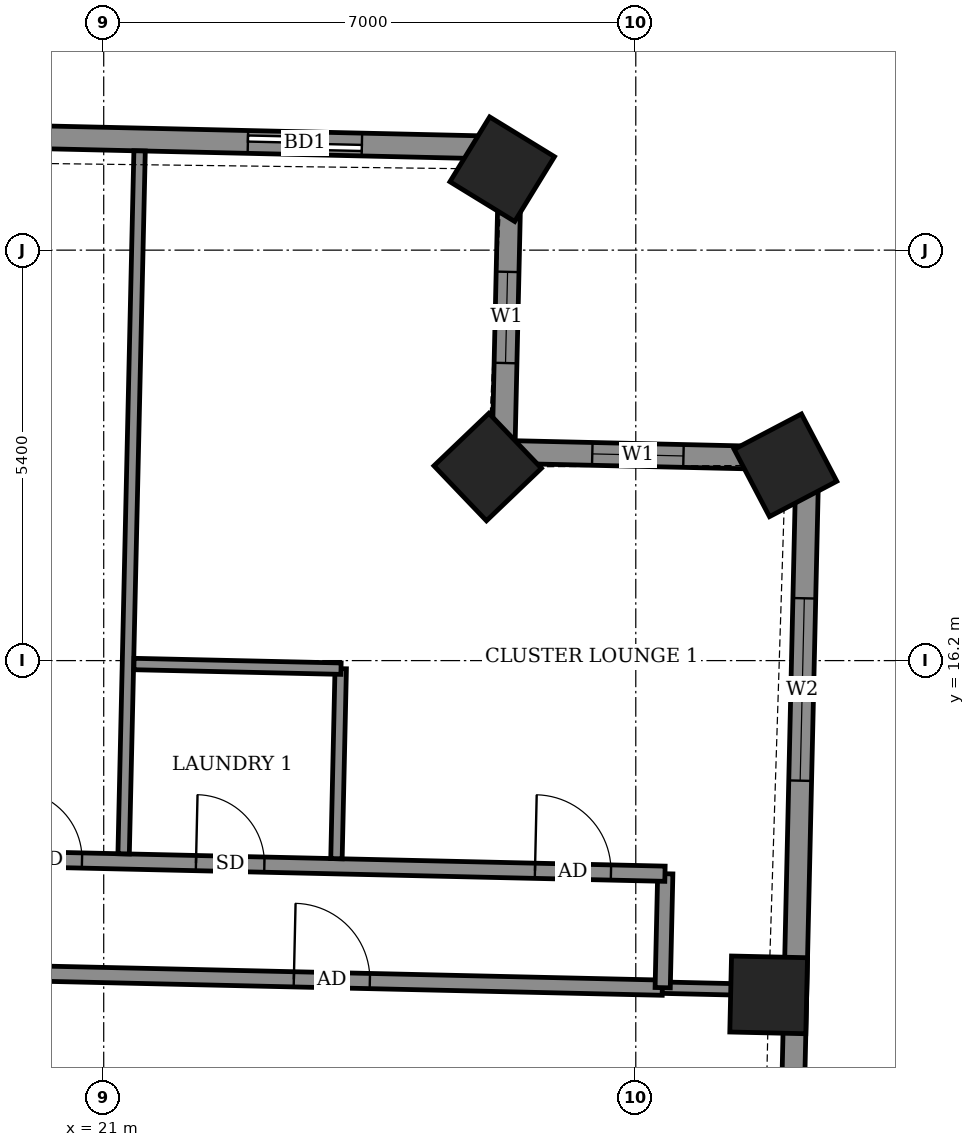
"""IFC4 building model, lengths in metres.
Left out: names, types, materials, properties, quantities, classifications, styles, units other than length and angle.
Written with IfcOpenShell. Run it as: python <this file> out.ifc"""

import sys

from ifc_helpers import new_model, si_unit, direction, frame, frame_2d, origin, origin_2d, place, context, subcontext, project, spatial, rectangle, extrude, element, fill, save


model = new_model("IFC4")
c1 = context("Model", 3, precision=1e-05, world=origin(), true_north=direction((0.0, 1.0)))
c2 = subcontext(c1, "Body", "Model", "MODEL_VIEW")
j1 = project(units=[si_unit("LENGTHUNIT", "METRE"), si_unit("PLANEANGLEUNIT", "RADIAN")], contexts=[c1])
p1 = place(None, origin())
s1 = spatial("IfcSite", under=j1, at=p1, CompositionType="ELEMENT")
p2 = place(p1, origin())
s2 = spatial("IfcBuilding", under=s1, at=p2, CompositionType="ELEMENT")
p3 = place(p2, frame((0.0, 0.0, 271.7)))
s3 = spatial("IfcBuildingStorey", under=s2, at=p3, CompositionType="ELEMENT", Elevation=271.7)
for number, where, z_axis, x_axis in (
    (1, (29.748, 11.802, -0.55), (0.0, 0.0, 1.0), (0.023, 1.0, 0.0)),
    (2, (29.969, 18.77, -0.55), (0.0, 0.0, 1.0), (-0.465, 0.885, 0.0)),
    (3, (26.052, 18.747, -0.55), (0.0, 0.0, 1.0), (-0.691, 0.723, 0.0)),
    (4, (26.243, 22.665, -0.55), (0.0, 0.0, 1.0), (-0.852, 0.523, 0.0)),
):
    element("IfcColumn", number, at=place(p3, frame(where, z_axis=z_axis, x_axis=x_axis)), inside=s3, PredefinedType="COLUMN", context=c2, shape_type="SweptSolid", body=[
        extrude(rectangle(XDim=1.0, YDim=1.0, at=origin_2d()), origin(), (0.0, 0.0, 1.0), 3.6),
    ])
p4 = place(p3, frame((29.923, 4.085, 0.0), z_axis=(0.0, 0.0, 1.0), x_axis=(0.022738672774, 0.999741442954, 0.0)))
e5 = element("IfcWall", 5, at=p4, inside=s3, PredefinedType="SOLIDWALL", context=c2, shape_type="SweptSolid", body=[
    extrude(rectangle(XDim=14.774, YDim=0.3, at=frame_2d((7.387, 0.0))), origin(), (0.0, 0.0, 1.0), 2.55),
])
p5 = place(p4, frame((4.853, 0.0, 0.0)))
e6 = element("IfcOpeningElement", 6, at=p5, cuts=e5, PredefinedType="OPENING", context=c2, shape_type="SweptSolid", body=[
    extrude(rectangle(XDim=1.5, YDim=2.4, at=frame_2d((0.75, 1.2))), frame((0.0, 0.16, 0.0), z_axis=(0.0, -1.0, 0.0), x_axis=(1.0, 0.0, 0.0)), (0.0, 0.0, 1.0), 0.32),
])
p6 = place(p4, frame((10.538, 0.0, 0.9)))
e7 = element("IfcOpeningElement", 7, at=p6, cuts=e5, PredefinedType="OPENING", context=c2, shape_type="SweptSolid", body=[
    extrude(rectangle(XDim=2.4, YDim=1.5, at=frame_2d((1.2, 0.75))), frame((0.0, 0.16, 0.0), z_axis=(0.0, -1.0, 0.0), x_axis=(1.0, 0.0, 0.0)), (0.0, 0.0, 1.0), 0.32),
])
p7 = place(p3, frame((30.259, 18.855, 0.0), z_axis=(0.0, 0.0, 1.0), x_axis=(-0.999740826251, 0.022765770952, 0.0)))
e8 = element("IfcWall", 8, at=p7, inside=s3, PredefinedType="SOLIDWALL", context=c2, shape_type="SweptSolid", body=[
    extrude(rectangle(XDim=4.0, YDim=0.3, at=frame_2d((2.0, 0.0))), origin(), (0.0, 0.0, 1.0), 2.55),
])
p8 = place(p7, frame((1.632, 0.0, 0.9)))
e9 = element("IfcOpeningElement", 9, at=p8, cuts=e8, PredefinedType="OPENING", context=c2, shape_type="SweptSolid", body=[
    extrude(rectangle(XDim=1.2, YDim=1.5, at=frame_2d((0.6, 0.75))), frame((0.0, 0.16, 0.0), z_axis=(0.0, -1.0, 0.0), x_axis=(1.0, 0.0, 0.0)), (0.0, 0.0, 1.0), 0.32),
])
p9 = place(p3, frame((26.26, 18.946, 0.0), z_axis=(0.0, 0.0, 1.0), x_axis=(0.022521758502, 0.999746353029, 0.0)))
e10 = element("IfcWall", 10, at=p9, inside=s3, PredefinedType="SOLIDWALL", context=c2, shape_type="SweptSolid", body=[
    extrude(rectangle(XDim=4.0, YDim=0.3, at=frame_2d((2.0, 0.0))), origin(), (0.0, 0.0, 1.0), 2.55),
])
p10 = place(p9, frame((1.169, 0.0, 0.9)))
e11 = element("IfcOpeningElement", 11, at=p10, cuts=e10, PredefinedType="OPENING", context=c2, shape_type="SweptSolid", body=[
    extrude(rectangle(XDim=1.2, YDim=1.5, at=frame_2d((0.6, 0.75))), frame((0.0, 0.16, 0.0), z_axis=(0.0, -1.0, 0.0), x_axis=(1.0, 0.0, 0.0)), (0.0, 0.0, 1.0), 0.32),
])
p11 = place(p3, frame((26.35, 22.945, 0.0), z_axis=(0.0, 0.0, 1.0), x_axis=(-0.999742523712, 0.022691105788, 0.0)))
e12 = element("IfcWall", 12, at=p11, inside=s3, PredefinedType="SOLIDWALL", context=c2, shape_type="SweptSolid", body=[
    extrude(rectangle(XDim=47.771, YDim=0.3, at=frame_2d((23.886, 0.0))), origin(), (0.0, 0.0, 1.0), 2.55),
])
p12 = place(p11, frame((1.954, 0.0, 0.0)))
e13 = element("IfcOpeningElement", 13, at=p12, cuts=e12, PredefinedType="OPENING", context=c2, shape_type="SweptSolid", body=[
    extrude(rectangle(XDim=1.5, YDim=2.4, at=frame_2d((0.75, 1.2))), frame((0.0, 0.16, 0.0), z_axis=(0.0, -1.0, 0.0), x_axis=(1.0, 0.0, 0.0)), (0.0, 0.0, 1.0), 0.32),
])
p13 = place(p11, frame((7.37, 0.0, 0.0)))
e14 = element("IfcOpeningElement", 14, at=p13, cuts=e12, PredefinedType="OPENING", context=c2, shape_type="SweptSolid", body=[
    extrude(rectangle(XDim=1.5, YDim=2.4, at=frame_2d((0.75, 1.2))), frame((0.0, 0.16, 0.0), z_axis=(0.0, -1.0, 0.0), x_axis=(1.0, 0.0, 0.0)), (0.0, 0.0, 1.0), 0.32),
])
p14 = place(p11, frame((10.554, 0.0, 0.0)))
e15 = element("IfcOpeningElement", 15, at=p14, cuts=e12, PredefinedType="OPENING", context=c2, shape_type="SweptSolid", body=[
    extrude(rectangle(XDim=1.5, YDim=2.4, at=frame_2d((0.75, 1.2))), frame((0.0, 0.16, 0.0), z_axis=(0.0, -1.0, 0.0), x_axis=(1.0, 0.0, 0.0)), (0.0, 0.0, 1.0), 0.32),
])
p15 = place(p11, frame((15.104, 0.0, 0.0)))
e16 = element("IfcOpeningElement", 16, at=p15, cuts=e12, PredefinedType="OPENING", context=c2, shape_type="SweptSolid", body=[
    extrude(rectangle(XDim=1.5, YDim=2.4, at=frame_2d((0.75, 1.2))), frame((0.0, 0.16, 0.0), z_axis=(0.0, -1.0, 0.0), x_axis=(1.0, 0.0, 0.0)), (0.0, 0.0, 1.0), 0.32),
])
p16 = place(p11, frame((18.287, 0.0, 0.0)))
e17 = element("IfcOpeningElement", 17, at=p16, cuts=e12, PredefinedType="OPENING", context=c2, shape_type="SweptSolid", body=[
    extrude(rectangle(XDim=1.5, YDim=2.4, at=frame_2d((0.75, 1.2))), frame((0.0, 0.16, 0.0), z_axis=(0.0, -1.0, 0.0), x_axis=(1.0, 0.0, 0.0)), (0.0, 0.0, 1.0), 0.32),
])
p17 = place(p11, frame((23.622, 0.0, 0.0)))
e18 = element("IfcOpeningElement", 18, at=p17, cuts=e12, PredefinedType="OPENING", context=c2, shape_type="SweptSolid", body=[
    extrude(rectangle(XDim=1.5, YDim=2.4, at=frame_2d((0.75, 1.2))), frame((0.0, 0.16, 0.0), z_axis=(0.0, -1.0, 0.0), x_axis=(1.0, 0.0, 0.0)), (0.0, 0.0, 1.0), 0.32),
])
p18 = place(p11, frame((28.521, 0.0, 0.0)))
e19 = element("IfcOpeningElement", 19, at=p18, cuts=e12, PredefinedType="OPENING", context=c2, shape_type="SweptSolid", body=[
    extrude(rectangle(XDim=1.5, YDim=2.4, at=frame_2d((0.75, 1.2))), frame((0.0, 0.16, 0.0), z_axis=(0.0, -1.0, 0.0), x_axis=(1.0, 0.0, 0.0)), (0.0, 0.0, 1.0), 0.32),
])
p19 = place(p11, frame((31.705, 0.0, 0.0)))
e20 = element("IfcOpeningElement", 20, at=p19, cuts=e12, PredefinedType="OPENING", context=c2, shape_type="SweptSolid", body=[
    extrude(rectangle(XDim=1.5, YDim=2.4, at=frame_2d((0.75, 1.2))), frame((0.0, 0.16, 0.0), z_axis=(0.0, -1.0, 0.0), x_axis=(1.0, 0.0, 0.0)), (0.0, 0.0, 1.0), 0.32),
])
p20 = place(p11, frame((36.722, 0.0, 0.0)))
e21 = element("IfcOpeningElement", 21, at=p20, cuts=e12, PredefinedType="OPENING", context=c2, shape_type="SweptSolid", body=[
    extrude(rectangle(XDim=1.5, YDim=2.4, at=frame_2d((0.75, 1.2))), frame((0.0, 0.16, 0.0), z_axis=(0.0, -1.0, 0.0), x_axis=(1.0, 0.0, 0.0)), (0.0, 0.0, 1.0), 0.32),
])
p21 = place(p11, frame((41.963, 0.0, 0.0)))
e22 = element("IfcOpeningElement", 22, at=p21, cuts=e12, PredefinedType="OPENING", context=c2, shape_type="SweptSolid", body=[
    extrude(rectangle(XDim=1.5, YDim=2.4, at=frame_2d((0.75, 1.2))), frame((0.0, 0.16, 0.0), z_axis=(0.0, -1.0, 0.0), x_axis=(1.0, 0.0, 0.0)), (0.0, 0.0, 1.0), 0.32),
])
p22 = place(p11, frame((44.436, 0.0, 0.9)))
e23 = element("IfcOpeningElement", 23, at=p22, cuts=e12, PredefinedType="OPENING", context=c2, shape_type="SweptSolid", body=[
    extrude(rectangle(XDim=2.4, YDim=1.5, at=frame_2d((1.2, 0.75))), frame((0.0, 0.16, 0.0), z_axis=(0.0, -1.0, 0.0), x_axis=(1.0, 0.0, 0.0)), (0.0, 0.0, 1.0), 0.32),
])
p23 = place(p3, frame((17.753, 12.137, 0.0), z_axis=(0.0, 0.0, 1.0), x_axis=(0.999743663474, -0.022640833553, 0.0)))
e24 = element("IfcWall", 24, at=p23, inside=s3, PredefinedType="PARTITIONING", context=c2, shape_type="SweptSolid", body=[
    extrude(rectangle(XDim=10.6, YDim=0.2, at=frame_2d((5.3, 0.0))), origin(), (0.0, 0.0, 1.0), 3.05),
])
p24 = place(p23, frame((5.75, 0.0, 0.0)))
e25 = element("IfcOpeningElement", 25, at=p24, cuts=e24, PredefinedType="OPENING", context=c2, shape_type="SweptSolid", body=[
    extrude(rectangle(XDim=1.0, YDim=2.1, at=frame_2d((0.5, 1.05))), frame((0.0, 0.11, 0.0), z_axis=(0.0, -1.0, 0.0), x_axis=(1.0, 0.0, 0.0)), (0.0, 0.0, 1.0), 0.22),
])
p25 = place(p3, frame((28.35, 11.897, 0.0), z_axis=(0.0, 0.0, 1.0), x_axis=(0.999734618493, -0.023036765969, 0.0)))
e26 = element("IfcWall", 26, at=p25, inside=s3, PredefinedType="PARTITIONING", context=c2, shape_type="SweptSolid", body=[
    extrude(rectangle(XDim=1.6, YDim=0.15, at=frame_2d((0.8, 0.0))), origin(), (0.0, 0.0, 1.0), 3.05),
])
p26 = place(p3, frame((28.354, 11.897, 0.0), z_axis=(0.0, 0.0, 1.0), x_axis=(0.022632637625, 0.99974384905, 0.0)))
e27 = element("IfcWall", 27, at=p26, inside=s3, PredefinedType="PARTITIONING", context=c2, shape_type="SweptSolid", body=[
    extrude(rectangle(XDim=1.5, YDim=0.2, at=frame_2d((0.75, 0.0))), origin(), (0.0, 0.0, 1.0), 3.05),
])
p27 = place(p3, frame((-24.474, 14.596, 0.0), z_axis=(0.0, 0.0, 1.0), x_axis=(0.999742424031, -0.022695497208, 0.0)))
e28 = element("IfcWall", 28, at=p27, inside=s3, PredefinedType="PARTITIONING", context=c2, shape_type="SweptSolid", body=[
    extrude(rectangle(XDim=52.872, YDim=0.2, at=frame_2d((26.436, 0.0))), origin(), (0.0, 0.0, 1.0), 3.05),
])
p28 = place(p27, frame((51.161, 0.0, 0.0)))
e29 = element("IfcOpeningElement", 29, at=p28, cuts=e28, PredefinedType="OPENING", context=c2, shape_type="SweptSolid", body=[
    extrude(rectangle(XDim=1.0, YDim=2.1, at=frame_2d((0.5, 1.05))), frame((0.0, 0.11, 0.0), z_axis=(0.0, -1.0, 0.0), x_axis=(1.0, 0.0, 0.0)), (0.0, 0.0, 1.0), 0.22),
])
p29 = place(p27, frame((46.7, 0.0, 0.0)))
e30 = element("IfcOpeningElement", 30, at=p29, cuts=e28, PredefinedType="OPENING", context=c2, shape_type="SweptSolid", body=[
    extrude(rectangle(XDim=0.9, YDim=2.1, at=frame_2d((0.45, 1.05))), frame((0.0, 0.11, 0.0), z_axis=(0.0, -1.0, 0.0), x_axis=(1.0, 0.0, 0.0)), (0.0, 0.0, 1.0), 0.22),
])
p30 = place(p27, frame((44.3, 0.0, 0.0)))
e31 = element("IfcOpeningElement", 31, at=p30, cuts=e28, PredefinedType="OPENING", context=c2, shape_type="SweptSolid", body=[
    extrude(rectangle(XDim=0.9, YDim=2.1, at=frame_2d((0.45, 1.05))), frame((0.0, 0.11, 0.0), z_axis=(0.0, -1.0, 0.0), x_axis=(1.0, 0.0, 0.0)), (0.0, 0.0, 1.0), 0.22),
])
p31 = place(p27, frame((37.575, 0.0, 0.0)))
e32 = element("IfcOpeningElement", 32, at=p31, cuts=e28, PredefinedType="OPENING", context=c2, shape_type="SweptSolid", body=[
    extrude(rectangle(XDim=0.9, YDim=2.1, at=frame_2d((0.45, 1.05))), frame((0.0, 0.11, 0.0), z_axis=(0.0, -1.0, 0.0), x_axis=(1.0, 0.0, 0.0)), (0.0, 0.0, 1.0), 0.22),
])
p32 = place(p27, frame((35.675, 0.0, 0.0)))
e33 = element("IfcOpeningElement", 33, at=p32, cuts=e28, PredefinedType="OPENING", context=c2, shape_type="SweptSolid", body=[
    extrude(rectangle(XDim=0.9, YDim=2.1, at=frame_2d((0.45, 1.05))), frame((0.0, 0.11, 0.0), z_axis=(0.0, -1.0, 0.0), x_axis=(1.0, 0.0, 0.0)), (0.0, 0.0, 1.0), 0.22),
])
p33 = place(p27, frame((28.95, 0.0, 0.0)))
e34 = element("IfcOpeningElement", 34, at=p33, cuts=e28, PredefinedType="OPENING", context=c2, shape_type="SweptSolid", body=[
    extrude(rectangle(XDim=0.9, YDim=2.1, at=frame_2d((0.45, 1.05))), frame((0.0, 0.11, 0.0), z_axis=(0.0, -1.0, 0.0), x_axis=(1.0, 0.0, 0.0)), (0.0, 0.0, 1.0), 0.22),
])
p34 = place(p27, frame((27.0, 0.0, 0.0)))
e35 = element("IfcOpeningElement", 35, at=p34, cuts=e28, PredefinedType="OPENING", context=c2, shape_type="SweptSolid", body=[
    extrude(rectangle(XDim=0.9, YDim=2.1, at=frame_2d((0.45, 1.05))), frame((0.0, 0.11, 0.0), z_axis=(0.0, -1.0, 0.0), x_axis=(1.0, 0.0, 0.0)), (0.0, 0.0, 1.0), 0.22),
])
p35 = place(p27, frame((20.2, 0.0, 0.0)))
e36 = element("IfcOpeningElement", 36, at=p35, cuts=e28, PredefinedType="OPENING", context=c2, shape_type="SweptSolid", body=[
    extrude(rectangle(XDim=0.9, YDim=2.1, at=frame_2d((0.45, 1.05))), frame((0.0, 0.11, 0.0), z_axis=(0.0, -1.0, 0.0), x_axis=(1.0, 0.0, 0.0)), (0.0, 0.0, 1.0), 0.22),
])
p36 = place(p27, frame((18.25, 0.0, 0.0)))
e37 = element("IfcOpeningElement", 37, at=p36, cuts=e28, PredefinedType="OPENING", context=c2, shape_type="SweptSolid", body=[
    extrude(rectangle(XDim=0.9, YDim=2.1, at=frame_2d((0.45, 1.05))), frame((0.0, 0.11, 0.0), z_axis=(0.0, -1.0, 0.0), x_axis=(1.0, 0.0, 0.0)), (0.0, 0.0, 1.0), 0.22),
])
p37 = place(p27, frame((11.5, 0.0, 0.0)))
e38 = element("IfcOpeningElement", 38, at=p37, cuts=e28, PredefinedType="OPENING", context=c2, shape_type="SweptSolid", body=[
    extrude(rectangle(XDim=0.9, YDim=2.1, at=frame_2d((0.45, 1.05))), frame((0.0, 0.11, 0.0), z_axis=(0.0, -1.0, 0.0), x_axis=(1.0, 0.0, 0.0)), (0.0, 0.0, 1.0), 0.22),
])
p38 = place(p27, frame((9.475, 0.0, 0.0)))
e39 = element("IfcOpeningElement", 39, at=p38, cuts=e28, PredefinedType="OPENING", context=c2, shape_type="SweptSolid", body=[
    extrude(rectangle(XDim=0.9, YDim=2.1, at=frame_2d((0.45, 1.05))), frame((0.0, 0.11, 0.0), z_axis=(0.0, -1.0, 0.0), x_axis=(1.0, 0.0, 0.0)), (0.0, 0.0, 1.0), 0.22),
])
p39 = place(p27, frame((2.293, 0.0, 0.0)))
e40 = element("IfcOpeningElement", 40, at=p39, cuts=e28, PredefinedType="OPENING", context=c2, shape_type="SweptSolid", body=[
    extrude(rectangle(XDim=1.0, YDim=2.1, at=frame_2d((0.5, 1.05))), frame((0.0, 0.11, 0.0), z_axis=(0.0, -1.0, 0.0), x_axis=(1.0, 0.0, 0.0)), (0.0, 0.0, 1.0), 0.22),
])
p40 = place(p3, frame((21.262, 13.658, 0.0), z_axis=(0.0, 0.0, 1.0), x_axis=(0.022697424684, 0.999742380272, 0.0)))
e41 = element("IfcWall", 41, at=p40, inside=s3, PredefinedType="PARTITIONING", context=c2, shape_type="SweptSolid", body=[
    extrude(rectangle(XDim=9.25, YDim=0.15, at=frame_2d((4.625, 0.0))), origin(), (0.0, 0.0, 1.0), 2.55),
])
p41 = place(p3, frame((24.062, 13.594, 0.0), z_axis=(0.0, 0.0, 1.0), x_axis=(0.022357691225, 0.99975003558, 0.0)))
e42 = element("IfcWall", 42, at=p41, inside=s3, PredefinedType="PARTITIONING", context=c2, shape_type="SweptSolid", body=[
    extrude(rectangle(XDim=2.501, YDim=0.15, at=frame_2d((1.25, 0.0))), origin(), (0.0, 0.0, 1.0), 3.05),
])
p42 = place(p3, frame((21.398, 16.155, 0.0), z_axis=(0.0, 0.0, 1.0), x_axis=(0.999749092391, -0.022399827308, 0.0)))
e43 = element("IfcWall", 43, at=p42, inside=s3, PredefinedType="PARTITIONING", context=c2, shape_type="SweptSolid", body=[
    extrude(rectangle(XDim=2.725, YDim=0.15, at=frame_2d((1.362, 0.0))), origin(), (0.0, 0.0, 1.0), 3.05),
])
p43 = place(p6, origin())
e44 = element("IfcWindow", 44, at=p43, inside=s3, PartitioningType="DOUBLE_PANEL_VERTICAL", PredefinedType="WINDOW", context=c2, shape_type="SweptSolid", body=[
    extrude(rectangle(XDim=2.4, YDim=1.5, at=frame_2d((1.2, 0.75))), frame((0.0, 0.03, 0.0), z_axis=(0.0, -1.0, 0.0), x_axis=(1.0, 0.0, 0.0)), (0.0, 0.0, 1.0), 0.06),
])
fill(e7, e44)
p44 = place(p8, origin())
e45 = element("IfcWindow", 45, at=p44, inside=s3, PartitioningType="SINGLE_PANEL", PredefinedType="WINDOW", context=c2, shape_type="SweptSolid", body=[
    extrude(rectangle(XDim=1.2, YDim=1.5, at=frame_2d((0.6, 0.75))), frame((0.0, 0.03, 0.0), z_axis=(0.0, -1.0, 0.0), x_axis=(1.0, 0.0, 0.0)), (0.0, 0.0, 1.0), 0.06),
])
fill(e9, e45)
p45 = place(p10, origin())
e46 = element("IfcWindow", 46, at=p45, inside=s3, PartitioningType="SINGLE_PANEL", PredefinedType="WINDOW", context=c2, shape_type="SweptSolid", body=[
    extrude(rectangle(XDim=1.2, YDim=1.5, at=frame_2d((0.6, 0.75))), frame((0.0, 0.03, 0.0), z_axis=(0.0, -1.0, 0.0), x_axis=(1.0, 0.0, 0.0)), (0.0, 0.0, 1.0), 0.06),
])
fill(e11, e46)
p46 = place(p12, origin())
e47 = element("IfcDoor", 47, at=p46, inside=s3, OperationType="SLIDING_TO_LEFT", PredefinedType="DOOR", context=c2, shape_type="SweptSolid", body=[
    extrude(rectangle(XDim=1.5, YDim=2.4, at=frame_2d((0.75, 1.2))), frame((0.0, 0.025, 0.0), z_axis=(0.0, -1.0, 0.0), x_axis=(1.0, 0.0, 0.0)), (0.0, 0.0, 1.0), 0.05),
])
fill(e13, e47)
p47 = place(p24, origin())
e48 = element("IfcDoor", 48, at=p47, inside=s3, OperationType="SINGLE_SWING_RIGHT", PredefinedType="DOOR", context=c2, shape_type="SweptSolid", body=[
    extrude(rectangle(XDim=1.0, YDim=2.1, at=frame_2d((0.5, 1.05))), frame((0.0, 0.025, 0.0), z_axis=(0.0, -1.0, 0.0), x_axis=(1.0, 0.0, 0.0)), (0.0, 0.0, 1.0), 0.05),
])
fill(e25, e48)
p48 = place(p28, origin())
e49 = element("IfcDoor", 49, at=p48, inside=s3, OperationType="SINGLE_SWING_LEFT", PredefinedType="DOOR", context=c2, shape_type="SweptSolid", body=[
    extrude(rectangle(XDim=1.0, YDim=2.1, at=frame_2d((0.5, 1.05))), frame((0.0, 0.025, 0.0), z_axis=(0.0, -1.0, 0.0), x_axis=(1.0, 0.0, 0.0)), (0.0, 0.0, 1.0), 0.05),
])
fill(e29, e49)
p49 = place(p29, origin())
e50 = element("IfcDoor", 50, at=p49, inside=s3, OperationType="SINGLE_SWING_RIGHT", PredefinedType="DOOR", context=c2, shape_type="SweptSolid", body=[
    extrude(rectangle(XDim=0.9, YDim=2.1, at=frame_2d((0.45, 1.05))), frame((0.0, 0.025, 0.0), z_axis=(0.0, -1.0, 0.0), x_axis=(1.0, 0.0, 0.0)), (0.0, 0.0, 1.0), 0.05),
])
fill(e30, e50)
p50 = place(p30, origin())
e51 = element("IfcDoor", 51, at=p50, inside=s3, OperationType="SINGLE_SWING_LEFT", PredefinedType="DOOR", context=c2, shape_type="SweptSolid", body=[
    extrude(rectangle(XDim=0.9, YDim=2.1, at=frame_2d((0.45, 1.05))), frame((0.0, 0.025, 0.0), z_axis=(0.0, -1.0, 0.0), x_axis=(1.0, 0.0, 0.0)), (0.0, 0.0, 1.0), 0.05),
])
fill(e31, e51)
save(model, sys.argv[1])
